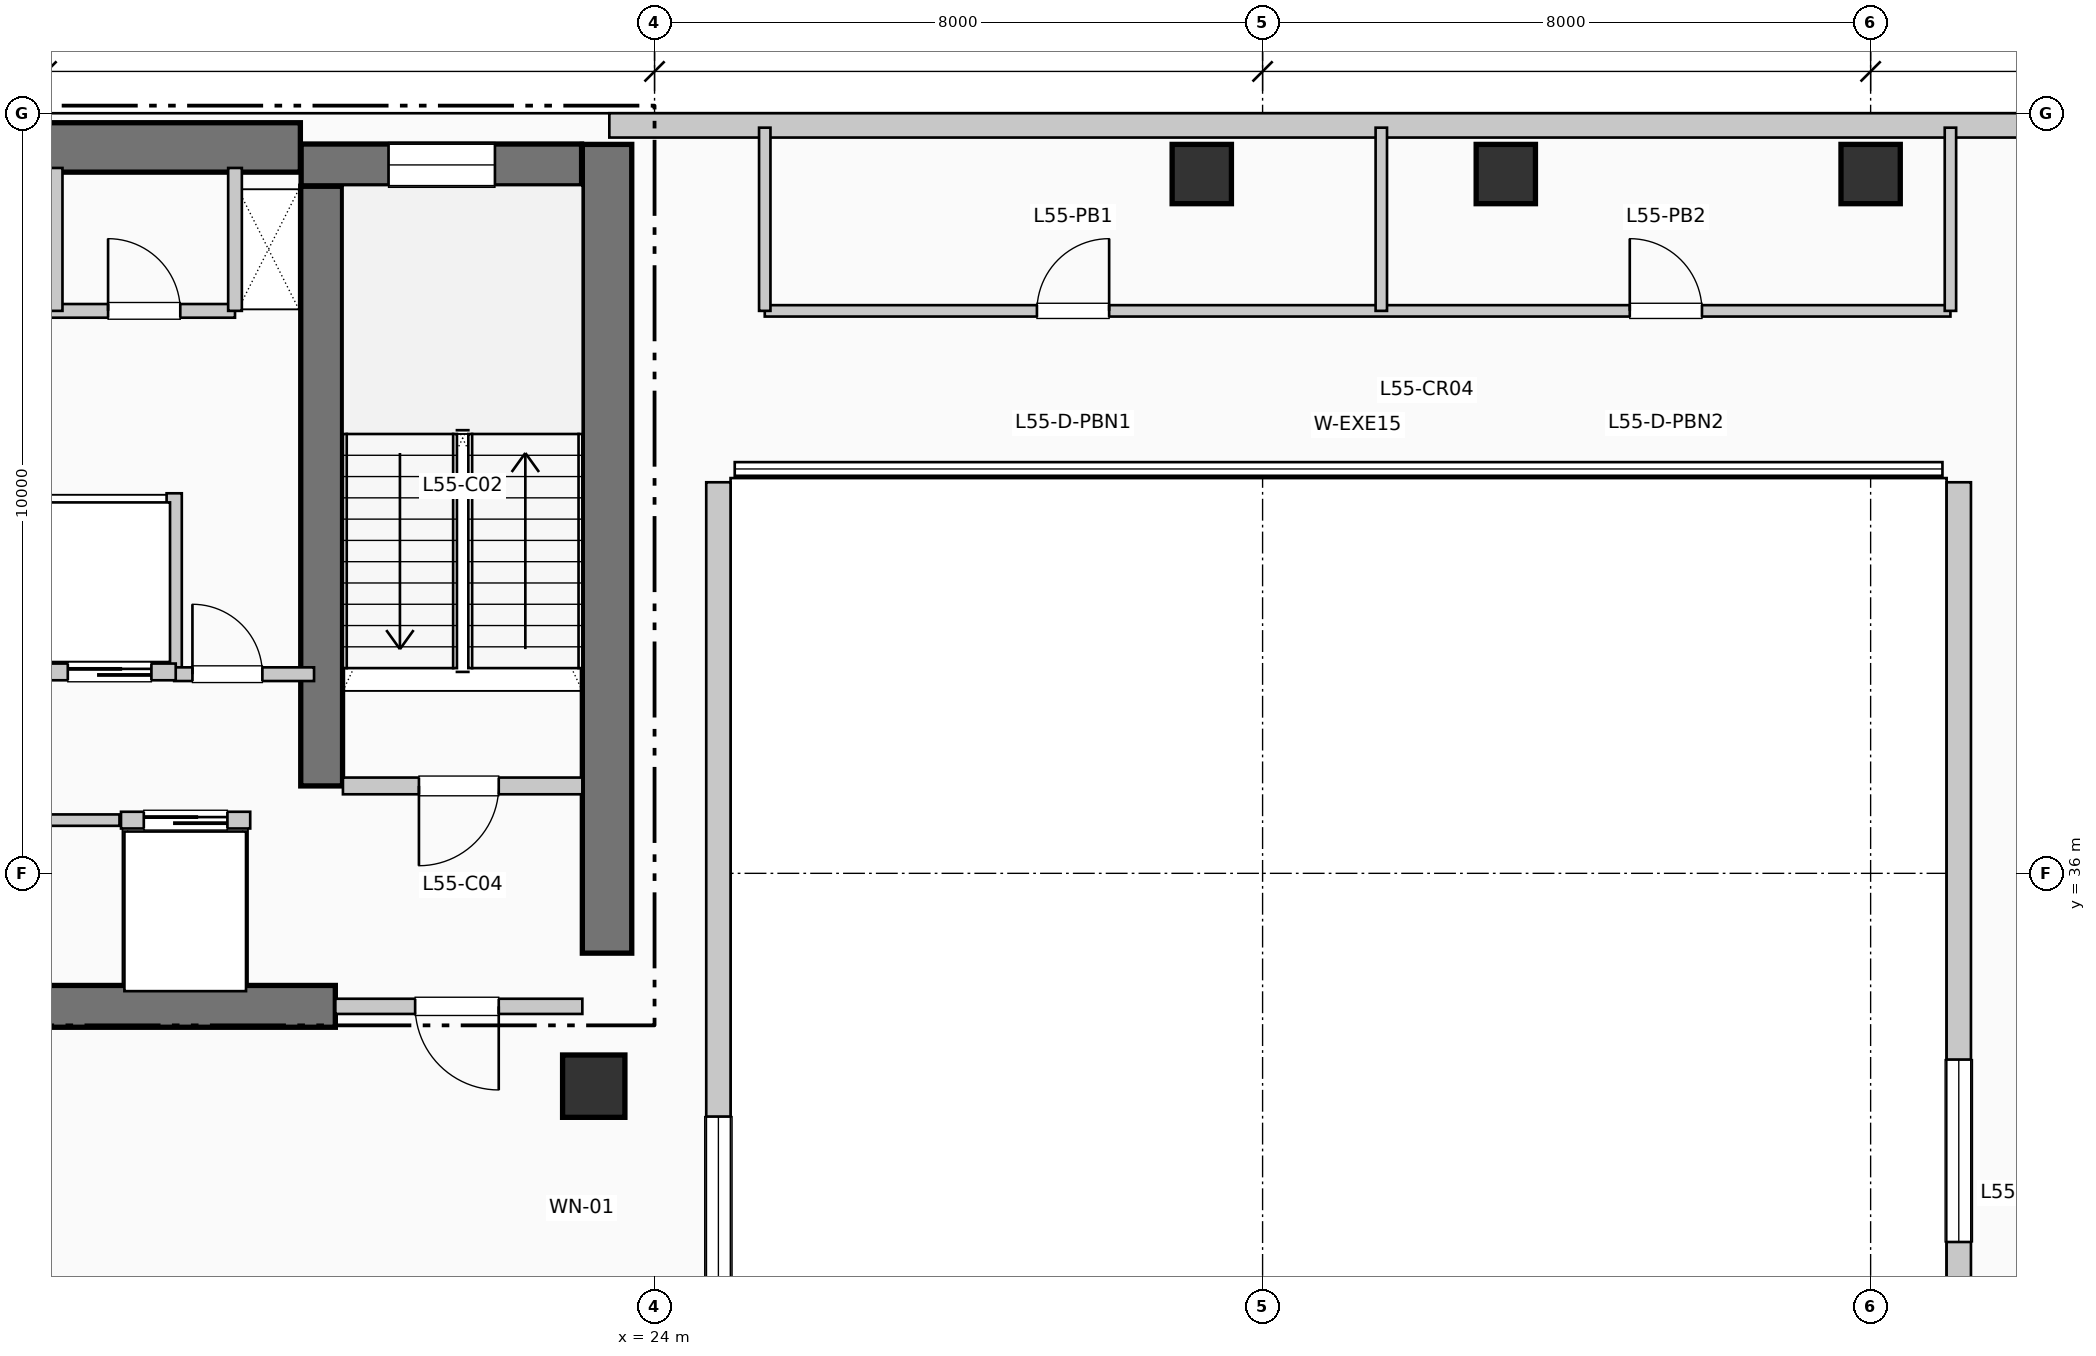
"""IFC4 building model, lengths in metres.
Left out: names, types, materials, properties, quantities, classifications, styles, units other than length and angle.
Written with IfcOpenShell. Run it as: python <this file> out.ifc"""

import sys

from ifc_helpers import new_model, si_unit, direction, frame, frame_2d, origin, origin_2d, place, context, subcontext, project, spatial, rectangle, extrude, element, fill, save


model = new_model("IFC4")
c1 = context("Model", 3, precision=1e-05, world=origin(), true_north=direction((0.0, 1.0)))
c2 = subcontext(c1, "Body", "Model", "MODEL_VIEW")
j1 = project(units=[si_unit("LENGTHUNIT", "METRE"), si_unit("PLANEANGLEUNIT", "RADIAN")], contexts=[c1])
p1 = place(None, origin())
s1 = spatial("IfcSite", under=j1, at=p1, CompositionType="ELEMENT")
p2 = place(p1, origin())
s2 = spatial("IfcBuilding", under=s1, at=p2, CompositionType="ELEMENT")
p3 = place(p2, frame((0.0, 0.0, 227.7)))
s3 = spatial("IfcBuildingStorey", under=s2, at=p3, CompositionType="ELEMENT", Elevation=227.7)
p4 = place(p3, frame((5.36, 45.55, 0.0), z_axis=(0.0, 0.0, 1.0), x_axis=(1.0, 0.0, 0.0)))
e1 = element("IfcWall", 1, at=p4, inside=s3, PredefinedType="SHEAR", context=c2, shape_type="SweptSolid", body=[
    extrude(rectangle(XDim=13.98, YDim=0.65, at=frame_2d((6.99, 0.0))), origin(), (0.0, 0.0, 1.0), 3.96),
])
p5 = place(p3, frame((23.375, 34.95, 0.0), z_axis=(0.0, 0.0, 1.0), x_axis=(0.0, 1.0, 0.0)))
e2 = element("IfcWall", 2, at=p5, inside=s3, PredefinedType="SHEAR", context=c2, shape_type="SweptSolid", body=[
    extrude(rectangle(XDim=10.64, YDim=0.65, at=frame_2d((5.32, 0.0))), origin(), (0.0, 0.0, 1.0), 3.96),
])
p6 = place(p3, frame((13.68, 34.25, 0.0), z_axis=(0.0, 0.0, 1.0), x_axis=(1.0, 0.0, 0.0)))
e3 = element("IfcWall", 3, at=p6, inside=s3, PredefinedType="SHEAR", context=c2, shape_type="SweptSolid", body=[
    extrude(rectangle(XDim=6.12, YDim=0.55, at=frame_2d((3.06, 0.0))), origin(), (0.0, 0.0, 1.0), 3.96),
])
p7 = place(p3, frame((19.62, 37.15, 0.0), z_axis=(0.0, 0.0, 1.0), x_axis=(0.0, 1.0, 0.0)))
e4 = element("IfcWall", 4, at=p7, inside=s3, PredefinedType="SHEAR", context=c2, shape_type="SweptSolid", body=[
    extrude(rectangle(XDim=7.89, YDim=0.55, at=frame_2d((3.945, 0.0))), origin(), (0.0, 0.0, 1.0), 3.96),
])
p8 = place(p3, frame((19.35, 45.32, 0.0), z_axis=(0.0, 0.0, 1.0), x_axis=(1.0, 0.0, 0.0)))
e5 = element("IfcWall", 5, at=p8, inside=s3, PredefinedType="SHEAR", context=c2, shape_type="SweptSolid", body=[
    extrude(rectangle(XDim=3.69, YDim=0.55, at=frame_2d((1.845, 0.0))), origin(), (0.0, 0.0, 1.0), 3.96),
])
p9 = place(p8, frame((1.15, 0.0, 1.05)))
e6 = element("IfcOpeningElement", 6, at=p9, cuts=e5, PredefinedType="OPENING", context=c2, shape_type="SweptSolid", body=[
    extrude(rectangle(XDim=1.4, YDim=1.8, at=frame_2d((0.7, 0.9))), frame((0.0, 0.285, 0.0), z_axis=(0.0, -1.0, 0.0), x_axis=(1.0, 0.0, 0.0)), (0.0, 0.0, 1.0), 0.57),
])
p10 = place(p3, frame((23.2, 33.2, 0.0), z_axis=(0.0, 0.0, 1.0), x_axis=(1.0, 0.0, 0.0)))
e7 = element("IfcColumn", 7, at=p10, inside=s3, PredefinedType="COLUMN", context=c2, shape_type="SweptSolid", body=[
    extrude(rectangle(XDim=0.82, YDim=0.82, at=origin_2d()), origin(), (0.0, 0.0, 1.0), 3.96),
])
for number, where, z_axis, x_axis in (
    (8, (31.2, 45.2, 0.0), (0.0, 0.0, 1.0), (1.0, 0.0, 0.0)),
    (9, (35.2, 45.2, 0.0), (0.0, 0.0, 1.0), (1.0, 0.0, 0.0)),
    (10, (40.0, 45.2, 0.0), (0.0, 0.0, 1.0), (1.0, 0.0, 0.0)),
):
    element("IfcColumn", number, at=place(p3, frame(where, z_axis=z_axis, x_axis=x_axis)), inside=s3, PredefinedType="COLUMN", context=c2, shape_type="SweptSolid", body=[
        extrude(rectangle(XDim=0.78, YDim=0.78, at=origin_2d()), origin(), (0.0, 0.0, 1.0), 3.96),
    ])
p11 = place(p3, frame((24.84, 22.055, 0.0), z_axis=(0.0, 0.0, 1.0), x_axis=(0.0, 1.0, 0.0)))
e11 = element("IfcWall", 11, at=p11, inside=s3, PredefinedType="SOLIDWALL", context=c2, shape_type="SweptSolid", body=[
    extrude(rectangle(XDim=19.09, YDim=0.32, at=frame_2d((9.545, 0.0))), origin(), (0.0, 0.0, 1.0), 3.71),
])
p12 = place(p11, frame((8.345, 0.0, 0.85)))
e12 = element("IfcOpeningElement", 12, at=p12, cuts=e11, PredefinedType="OPENING", context=c2, shape_type="SweptSolid", body=[
    extrude(rectangle(XDim=2.4, YDim=2.05, at=frame_2d((1.2, 1.025))), frame((0.0, 0.17, 0.0), z_axis=(0.0, -1.0, 0.0), x_axis=(1.0, 0.0, 0.0)), (0.0, 0.0, 1.0), 0.34),
])
p13 = place(p3, frame((41.16, 41.145, 0.0), z_axis=(0.0, 0.0, 1.0), x_axis=(0.0, -1.0, 0.0)))
e13 = element("IfcWall", 13, at=p13, inside=s3, PredefinedType="SOLIDWALL", context=c2, shape_type="SweptSolid", body=[
    extrude(rectangle(XDim=17.59, YDim=0.32, at=frame_2d((8.795, 0.0))), origin(), (0.0, 0.0, 1.0), 3.71),
])
p14 = place(p13, frame((7.595, 0.0, 0.85)))
e14 = element("IfcOpeningElement", 14, at=p14, cuts=e13, PredefinedType="OPENING", context=c2, shape_type="SweptSolid", body=[
    extrude(rectangle(XDim=2.4, YDim=2.05, at=frame_2d((1.2, 1.025))), frame((0.0, 0.17, 0.0), z_axis=(0.0, -1.0, 0.0), x_axis=(1.0, 0.0, 0.0)), (0.0, 0.0, 1.0), 0.34),
])
p15 = place(p3, frame((47.145, 45.84, 0.0), z_axis=(0.0, 0.0, 1.0), x_axis=(-1.0, 0.0, 0.0)))
e15 = element("IfcWall", 15, at=p15, inside=s3, PredefinedType="SOLIDWALL", context=c2, shape_type="SweptSolid", body=[
    extrude(rectangle(XDim=23.74, YDim=0.32, at=frame_2d((11.87, 0.0))), origin(), (0.0, 0.0, 1.0), 3.71),
])
p16 = place(p3, frame((19.9, 37.15, 0.0), z_axis=(0.0, 0.0, 1.0), x_axis=(1.0, 0.0, 0.0)))
e16 = element("IfcWall", 16, at=p16, inside=s3, PredefinedType="PARTITIONING", context=c2, shape_type="SweptSolid", body=[
    extrude(rectangle(XDim=3.15, YDim=0.22, at=frame_2d((1.575, 0.0))), origin(), (0.0, 0.0, 1.0), 3.71),
])
p17 = place(p16, frame((2.05, 0.0, 0.0), z_axis=(0.0, 0.0, 1.0), x_axis=(-1.0, 0.0, 0.0)))
e17 = element("IfcOpeningElement", 17, at=p17, cuts=e16, PredefinedType="OPENING", context=c2, shape_type="SweptSolid", body=[
    extrude(rectangle(XDim=1.05, YDim=2.15, at=frame_2d((0.525, 1.075))), frame((0.0, 0.12, 0.0), z_axis=(0.0, -1.0, 0.0), x_axis=(1.0, 0.0, 0.0)), (0.0, 0.0, 1.0), 0.24),
])
p18 = place(p3, frame((19.8, 34.25, 0.0), z_axis=(0.0, 0.0, 1.0), x_axis=(1.0, 0.0, 0.0)))
e18 = element("IfcWall", 18, at=p18, inside=s3, PredefinedType="PARTITIONING", context=c2, shape_type="SweptSolid", body=[
    extrude(rectangle(XDim=3.25, YDim=0.2, at=frame_2d((1.625, 0.0))), origin(), (0.0, 0.0, 1.0), 3.71),
])
p19 = place(p18, frame((2.15, 0.0, 0.0), z_axis=(0.0, 0.0, 1.0), x_axis=(-1.0, 0.0, 0.0)))
e19 = element("IfcOpeningElement", 19, at=p19, cuts=e18, PredefinedType="OPENING", context=c2, shape_type="SweptSolid", body=[
    extrude(rectangle(XDim=1.1, YDim=2.15, at=frame_2d((0.55, 1.075))), frame((0.0, 0.11, 0.0), z_axis=(0.0, -1.0, 0.0), x_axis=(1.0, 0.0, 0.0)), (0.0, 0.0, 1.0), 0.22),
])
p20 = place(p3, frame((17.68, 38.65, 0.0), z_axis=(0.0, 0.0, 1.0), x_axis=(0.0, 1.0, 0.0)))
e20 = element("IfcWall", 20, at=p20, inside=s3, PredefinedType="PARTITIONING", context=c2, shape_type="SweptSolid", body=[
    extrude(rectangle(XDim=2.35, YDim=0.2, at=frame_2d((1.175, 0.0))), origin(), (0.0, 0.0, 1.0), 3.71),
])
p21 = place(p3, frame((17.68, 38.62, 0.0), z_axis=(0.0, 0.0, 1.0), x_axis=(1.0, 0.0, 0.0)))
e21 = element("IfcWall", 21, at=p21, inside=s3, PredefinedType="PARTITIONING", context=c2, shape_type="SweptSolid", body=[
    extrude(rectangle(XDim=1.84, YDim=0.18, at=frame_2d((0.92, 0.0))), origin(), (0.0, 0.0, 1.0), 3.71),
])
p22 = place(p21, frame((0.24, 0.0, 0.0)))
e22 = element("IfcOpeningElement", 22, at=p22, cuts=e21, PredefinedType="OPENING", context=c2, shape_type="SweptSolid", body=[
    extrude(rectangle(XDim=0.92, YDim=2.1, at=frame_2d((0.46, 1.05))), frame((0.0, 0.1, 0.0), z_axis=(0.0, -1.0, 0.0), x_axis=(1.0, 0.0, 0.0)), (0.0, 0.0, 1.0), 0.2),
])
p23 = place(p3, frame((13.68, 36.7, 0.0), z_axis=(0.0, 0.0, 1.0), x_axis=(1.0, 0.0, 0.0)))
e23 = element("IfcWall", 23, at=p23, inside=s3, PredefinedType="PARTITIONING", context=c2, shape_type="SweptSolid", body=[
    extrude(rectangle(XDim=3.28, YDim=0.15, at=frame_2d((1.64, 0.0))), origin(), (0.0, 0.0, 1.0), 3.71),
])
p24 = place(p23, frame((1.15, 0.0, 0.0)))
e24 = element("IfcOpeningElement", 24, at=p24, cuts=e23, PredefinedType="OPENING", context=c2, shape_type="SweptSolid", body=[
    extrude(rectangle(XDim=0.95, YDim=2.15, at=frame_2d((0.475, 1.075))), frame((0.0, 0.085, 0.0), z_axis=(0.0, -1.0, 0.0), x_axis=(1.0, 0.0, 0.0)), (0.0, 0.0, 1.0), 0.17),
])
p25 = place(p3, frame((16.98, 36.7, 0.0), z_axis=(0.0, 0.0, 1.0), x_axis=(1.0, 0.0, 0.0)))
e25 = element("IfcWall", 25, at=p25, inside=s3, PredefinedType="PARTITIONING", context=c2, shape_type="SweptSolid", body=[
    extrude(rectangle(XDim=1.7, YDim=0.22, at=frame_2d((0.85, 0.0))), origin(), (0.0, 0.0, 1.0), 3.71),
])
p26 = place(p25, frame((0.3, 0.0, 0.0)))
e26 = element("IfcOpeningElement", 26, at=p26, cuts=e25, PredefinedType="OPENING", context=c2, shape_type="SweptSolid", body=[
    extrude(rectangle(XDim=1.1, YDim=2.2, at=frame_2d((0.55, 1.1))), frame((0.0, 0.12, 0.0), z_axis=(0.0, -1.0, 0.0), x_axis=(1.0, 0.0, 0.0)), (0.0, 0.0, 1.0), 0.24),
])
p27 = place(p3, frame((15.98, 38.65, 0.0), z_axis=(0.0, 0.0, 1.0), x_axis=(1.0, 0.0, 0.0)))
e27 = element("IfcWall", 27, at=p27, inside=s3, PredefinedType="PARTITIONING", context=c2, shape_type="SweptSolid", body=[
    extrude(rectangle(XDim=1.72, YDim=0.22, at=frame_2d((0.86, 0.0))), origin(), (0.0, 0.0, 1.0), 3.71),
])
p28 = place(p27, frame((0.3, 0.0, 0.0)))
e28 = element("IfcOpeningElement", 28, at=p28, cuts=e27, PredefinedType="OPENING", context=c2, shape_type="SweptSolid", body=[
    extrude(rectangle(XDim=1.1, YDim=2.2, at=frame_2d((0.55, 1.1))), frame((0.0, 0.12, 0.0), z_axis=(0.0, -1.0, 0.0), x_axis=(1.0, 0.0, 0.0)), (0.0, 0.0, 1.0), 0.24),
])
p29 = place(p3, frame((9.15, 43.4, 0.0), z_axis=(0.0, 0.0, 1.0), x_axis=(1.0, 0.0, 0.0)))
e29 = element("IfcWall", 29, at=p29, inside=s3, PredefinedType="PLUMBINGWALL", context=c2, shape_type="SweptSolid", body=[
    extrude(rectangle(XDim=9.33, YDim=0.18, at=frame_2d((4.665, 0.0))), origin(), (0.0, 0.0, 1.0), 3.71),
])
p30 = place(p29, frame((0.72, 0.0, 0.0)))
e30 = element("IfcOpeningElement", 30, at=p30, cuts=e29, PredefinedType="OPENING", context=c2, shape_type="SweptSolid", body=[
    extrude(rectangle(XDim=0.92, YDim=2.1, at=frame_2d((0.46, 1.05))), frame((0.0, 0.1, 0.0), z_axis=(0.0, -1.0, 0.0), x_axis=(1.0, 0.0, 0.0)), (0.0, 0.0, 1.0), 0.2),
])
p31 = place(p29, frame((3.02, 0.0, 0.0)))
e31 = element("IfcOpeningElement", 31, at=p31, cuts=e29, PredefinedType="OPENING", context=c2, shape_type="SweptSolid", body=[
    extrude(rectangle(XDim=0.92, YDim=2.1, at=frame_2d((0.46, 1.05))), frame((0.0, 0.1, 0.0), z_axis=(0.0, -1.0, 0.0), x_axis=(1.0, 0.0, 0.0)), (0.0, 0.0, 1.0), 0.2),
])
p32 = place(p29, frame((5.34, 0.0, 0.0)))
e32 = element("IfcOpeningElement", 32, at=p32, cuts=e29, PredefinedType="OPENING", context=c2, shape_type="SweptSolid", body=[
    extrude(rectangle(XDim=0.92, YDim=2.1, at=frame_2d((0.46, 1.05))), frame((0.0, 0.1, 0.0), z_axis=(0.0, -1.0, 0.0), x_axis=(1.0, 0.0, 0.0)), (0.0, 0.0, 1.0), 0.2),
])
p33 = place(p29, frame((7.66, 0.0, 0.0)))
e33 = element("IfcOpeningElement", 33, at=p33, cuts=e29, PredefinedType="OPENING", context=c2, shape_type="SweptSolid", body=[
    extrude(rectangle(XDim=0.95, YDim=2.1, at=frame_2d((0.475, 1.05))), frame((0.0, 0.1, 0.0), z_axis=(0.0, -1.0, 0.0), x_axis=(1.0, 0.0, 0.0)), (0.0, 0.0, 1.0), 0.2),
])
for number, where, z_axis, x_axis in (
    (34, (18.48, 43.4, 0.0), (0.0, 0.0, 1.0), (0.0, 1.0, 0.0)),
    (35, (16.12, 43.4, 0.0), (0.0, 0.0, 1.0), (0.0, 1.0, 0.0)),
):
    element("IfcWall", number, at=place(p3, frame(where, z_axis=z_axis, x_axis=x_axis)), inside=s3, PredefinedType="PLUMBINGWALL", context=c2, shape_type="SweptSolid", body=[
        extrude(rectangle(XDim=1.88, YDim=0.18, at=frame_2d((0.94, 0.0))), origin(), (0.0, 0.0, 1.0), 3.71),
    ])
p34 = place(p3, frame((25.45, 43.4, 0.0), z_axis=(0.0, 0.0, 1.0), x_axis=(1.0, 0.0, 0.0)))
e36 = element("IfcWall", 36, at=p34, inside=s3, PredefinedType="PARTITIONING", context=c2, shape_type="SweptSolid", body=[
    extrude(rectangle(XDim=15.6, YDim=0.15, at=frame_2d((7.8, 0.0))), origin(), (0.0, 0.0, 1.0), 3.71),
])
p35 = place(p34, frame((3.581, 0.0, 0.0)))
e37 = element("IfcOpeningElement", 37, at=p35, cuts=e36, PredefinedType="OPENING", context=c2, shape_type="SweptSolid", body=[
    extrude(rectangle(XDim=0.95, YDim=2.15, at=frame_2d((0.475, 1.075))), frame((0.0, 0.085, 0.0), z_axis=(0.0, -1.0, 0.0), x_axis=(1.0, 0.0, 0.0)), (0.0, 0.0, 1.0), 0.17),
])
p36 = place(p34, frame((11.381, 0.0, 0.0)))
e38 = element("IfcOpeningElement", 38, at=p36, cuts=e36, PredefinedType="OPENING", context=c2, shape_type="SweptSolid", body=[
    extrude(rectangle(XDim=0.95, YDim=2.15, at=frame_2d((0.475, 1.075))), frame((0.0, 0.085, 0.0), z_axis=(0.0, -1.0, 0.0), x_axis=(1.0, 0.0, 0.0)), (0.0, 0.0, 1.0), 0.17),
])
for number, where, z_axis, x_axis in (
    (39, (25.45, 43.4, 0.0), (0.0, 0.0, 1.0), (0.0, 1.0, 0.0)),
    (40, (41.05, 43.4, 0.0), (0.0, 0.0, 1.0), (0.0, 1.0, 0.0)),
    (41, (33.562, 43.4, 0.0), (0.0, 0.0, 1.0), (0.0, 1.0, 0.0)),
):
    element("IfcWall", number, at=place(p3, frame(where, z_axis=z_axis, x_axis=x_axis)), inside=s3, PredefinedType="PARTITIONING", context=c2, shape_type="SweptSolid", body=[
        extrude(rectangle(XDim=2.41, YDim=0.15, at=frame_2d((1.205, 0.0))), origin(), (0.0, 0.0, 1.0), 3.71),
    ])
p37 = place(p9, origin())
e42 = element("IfcWindow", 42, at=p37, inside=s3, PartitioningType="SINGLE_PANEL", PredefinedType="WINDOW", context=c2, shape_type="SweptSolid", body=[
    extrude(rectangle(XDim=1.4, YDim=1.8, at=frame_2d((0.7, 0.9))), frame((0.0, 0.03, 0.0), z_axis=(0.0, -1.0, 0.0), x_axis=(1.0, 0.0, 0.0)), (0.0, 0.0, 1.0), 0.06),
])
fill(e6, e42)
p38 = place(p12, origin())
e43 = element("IfcWindow", 43, at=p38, inside=s3, PartitioningType="SINGLE_PANEL", PredefinedType="WINDOW", context=c2, shape_type="SweptSolid", body=[
    extrude(rectangle(XDim=2.4, YDim=2.05, at=frame_2d((1.2, 1.025))), frame((0.0, 0.03, 0.0), z_axis=(0.0, -1.0, 0.0), x_axis=(1.0, 0.0, 0.0)), (0.0, 0.0, 1.0), 0.06),
])
fill(e12, e43)
p39 = place(p14, origin())
e44 = element("IfcWindow", 44, at=p39, inside=s3, PartitioningType="SINGLE_PANEL", PredefinedType="WINDOW", context=c2, shape_type="SweptSolid", body=[
    extrude(rectangle(XDim=2.4, YDim=2.05, at=frame_2d((1.2, 1.025))), frame((0.0, 0.03, 0.0), z_axis=(0.0, -1.0, 0.0), x_axis=(1.0, 0.0, 0.0)), (0.0, 0.0, 1.0), 0.06),
])
fill(e14, e44)
p40 = place(p17, origin())
e45 = element("IfcDoor", 45, at=p40, inside=s3, OperationType="SINGLE_SWING_LEFT", PredefinedType="DOOR", context=c2, shape_type="SweptSolid", body=[
    extrude(rectangle(XDim=1.05, YDim=2.15, at=frame_2d((0.525, 1.075))), frame((0.0, 0.025, 0.0), z_axis=(0.0, -1.0, 0.0), x_axis=(1.0, 0.0, 0.0)), (0.0, 0.0, 1.0), 0.05),
])
fill(e17, e45)
p41 = place(p19, origin())
e46 = element("IfcDoor", 46, at=p41, inside=s3, OperationType="SINGLE_SWING_RIGHT", PredefinedType="DOOR", context=c2, shape_type="SweptSolid", body=[
    extrude(rectangle(XDim=1.1, YDim=2.15, at=frame_2d((0.55, 1.075))), frame((0.0, 0.025, 0.0), z_axis=(0.0, -1.0, 0.0), x_axis=(1.0, 0.0, 0.0)), (0.0, 0.0, 1.0), 0.05),
])
fill(e19, e46)
p42 = place(p22, origin())
e47 = element("IfcDoor", 47, at=p42, inside=s3, OperationType="SINGLE_SWING_LEFT", PredefinedType="DOOR", context=c2, shape_type="SweptSolid", body=[
    extrude(rectangle(XDim=0.92, YDim=2.1, at=frame_2d((0.46, 1.05))), frame((0.0, 0.025, 0.0), z_axis=(0.0, -1.0, 0.0), x_axis=(1.0, 0.0, 0.0)), (0.0, 0.0, 1.0), 0.05),
])
fill(e22, e47)
p43 = place(p26, origin())
e48 = element("IfcDoor", 48, at=p43, inside=s3, OperationType="SLIDING_TO_LEFT", PredefinedType="DOOR", context=c2, shape_type="SweptSolid", body=[
    extrude(rectangle(XDim=1.1, YDim=2.2, at=frame_2d((0.55, 1.1))), frame((0.0, 0.025, 0.0), z_axis=(0.0, -1.0, 0.0), x_axis=(1.0, 0.0, 0.0)), (0.0, 0.0, 1.0), 0.05),
])
fill(e26, e48)
p44 = place(p28, origin())
e49 = element("IfcDoor", 49, at=p44, inside=s3, OperationType="SLIDING_TO_LEFT", PredefinedType="DOOR", context=c2, shape_type="SweptSolid", body=[
    extrude(rectangle(XDim=1.1, YDim=2.2, at=frame_2d((0.55, 1.1))), frame((0.0, 0.025, 0.0), z_axis=(0.0, -1.0, 0.0), x_axis=(1.0, 0.0, 0.0)), (0.0, 0.0, 1.0), 0.05),
])
fill(e28, e49)
p45 = place(p33, origin())
e50 = element("IfcDoor", 50, at=p45, inside=s3, OperationType="SINGLE_SWING_LEFT", PredefinedType="DOOR", context=c2, shape_type="SweptSolid", body=[
    extrude(rectangle(XDim=0.95, YDim=2.1, at=frame_2d((0.475, 1.05))), frame((0.0, 0.025, 0.0), z_axis=(0.0, -1.0, 0.0), x_axis=(1.0, 0.0, 0.0)), (0.0, 0.0, 1.0), 0.05),
])
fill(e33, e50)
p46 = place(p35, origin())
e51 = element("IfcDoor", 51, at=p46, inside=s3, OperationType="SINGLE_SWING_RIGHT", PredefinedType="DOOR", context=c2, shape_type="SweptSolid", body=[
    extrude(rectangle(XDim=0.95, YDim=2.15, at=frame_2d((0.475, 1.075))), frame((0.0, 0.025, 0.0), z_axis=(0.0, -1.0, 0.0), x_axis=(1.0, 0.0, 0.0)), (0.0, 0.0, 1.0), 0.05),
])
fill(e37, e51)
p47 = place(p36, origin())
e52 = element("IfcDoor", 52, at=p47, inside=s3, OperationType="SINGLE_SWING_LEFT", PredefinedType="DOOR", context=c2, shape_type="SweptSolid", body=[
    extrude(rectangle(XDim=0.95, YDim=2.15, at=frame_2d((0.475, 1.075))), frame((0.0, 0.025, 0.0), z_axis=(0.0, -1.0, 0.0), x_axis=(1.0, 0.0, 0.0)), (0.0, 0.0, 1.0), 0.05),
])
fill(e38, e52)
save(model, sys.argv[1])
